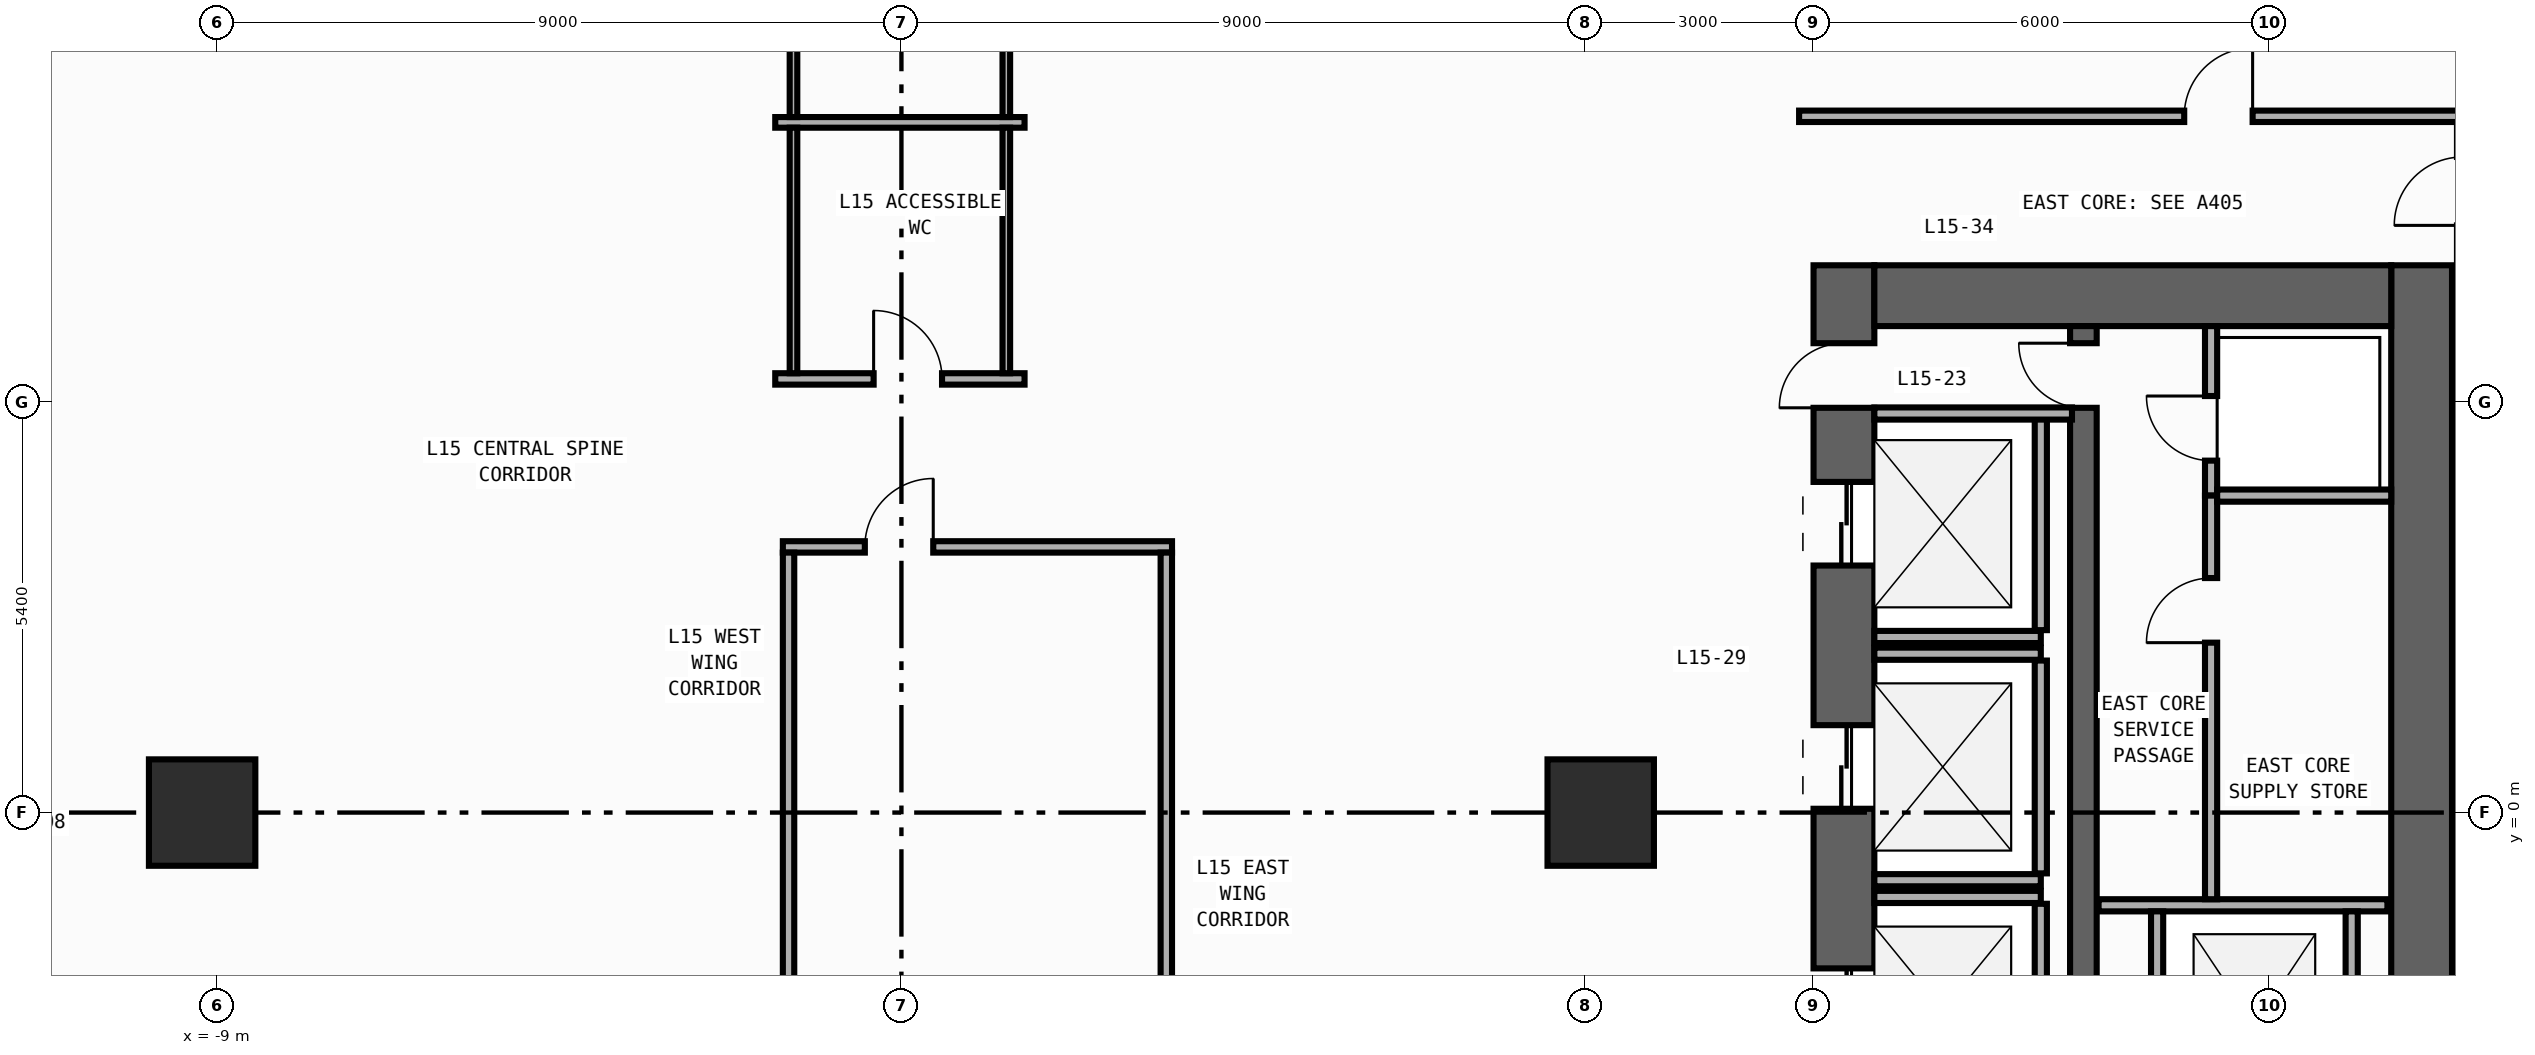
"""IFC4 building model, lengths in metres.
Left out: names, types, materials, properties, quantities, classifications, styles, units other than length and angle.
Written with IfcOpenShell. Run it as: python <this file> out.ifc"""

import sys

from ifc_helpers import new_model, si_unit, direction, frame, frame_2d, origin, origin_2d, place, context, subcontext, project, spatial, rectangle, extrude, element, fill, save


model = new_model("IFC4")
c1 = context("Model", 3, precision=1e-05, world=origin(), true_north=direction((0.0, 1.0)))
c2 = subcontext(c1, "Body", "Model", "MODEL_VIEW")
j1 = project(units=[si_unit("LENGTHUNIT", "METRE"), si_unit("PLANEANGLEUNIT", "RADIAN")], contexts=[c1])
p1 = place(None, origin())
s1 = spatial("IfcSite", under=j1, at=p1, CompositionType="ELEMENT")
p2 = place(p1, origin())
s2 = spatial("IfcBuilding", under=s1, at=p2, CompositionType="ELEMENT")
p3 = place(p2, frame((0.0, 0.0, 63.8)))
s3 = spatial("IfcBuildingStorey", under=s2, at=p3, CompositionType="ELEMENT", Elevation=63.8)
p4 = place(p3, frame((12.4, -19.8, 0.0), z_axis=(0.0, 0.0, 1.0), x_axis=(0.0, 1.0, 0.0)))
e1 = element("IfcWall", 1, at=p4, inside=s3, PredefinedType="SHEAR", context=c2, shape_type="SweptSolid", body=[
    extrude(rectangle(XDim=27.0, YDim=0.8, at=frame_2d((13.5, 0.0))), origin(), (0.0, 0.0, 1.0), 3.94),
])
p5 = place(p4, frame((23.05, 0.0, 0.0)))
e2 = element("IfcOpeningElement", 2, at=p5, cuts=e1, PredefinedType="OPENING", context=c2, shape_type="SweptSolid", body=[
    extrude(rectangle(XDim=1.1, YDim=2.2, at=frame_2d((0.55, 1.1))), frame((0.0, 0.41, 0.0), z_axis=(0.0, -1.0, 0.0), x_axis=(1.0, 0.0, 0.0)), (0.0, 0.0, 1.0), 0.82),
])
p6 = place(p4, frame((19.85, 0.0, 0.0)))
e3 = element("IfcOpeningElement", 3, at=p6, cuts=e1, PredefinedType="OPENING", context=c2, shape_type="SweptSolid", body=[
    extrude(rectangle(XDim=1.1, YDim=2.2, at=frame_2d((0.55, 1.1))), frame((0.0, 0.41, 0.0), z_axis=(0.0, -1.0, 0.0), x_axis=(1.0, 0.0, 0.0)), (0.0, 0.0, 1.0), 0.82),
])
p7 = place(p4, frame((16.65, 0.0, 0.0)))
e4 = element("IfcOpeningElement", 4, at=p7, cuts=e1, PredefinedType="OPENING", context=c2, shape_type="SweptSolid", body=[
    extrude(rectangle(XDim=1.1, YDim=2.2, at=frame_2d((0.55, 1.1))), frame((0.0, 0.41, 0.0), z_axis=(0.0, -1.0, 0.0), x_axis=(1.0, 0.0, 0.0)), (0.0, 0.0, 1.0), 0.82),
])
p8 = place(p4, frame((10.175, 0.0, 0.0)))
e5 = element("IfcOpeningElement", 5, at=p8, cuts=e1, PredefinedType="OPENING", context=c2, shape_type="SweptSolid", body=[
    extrude(rectangle(XDim=0.85, YDim=2.1, at=frame_2d((0.425, 1.05))), frame((0.0, 0.41, 0.0), z_axis=(0.0, -1.0, 0.0), x_axis=(1.0, 0.0, 0.0)), (0.0, 0.0, 1.0), 0.82),
])
p9 = place(p4, frame((12.725, 0.0, 0.0)))
e6 = element("IfcOpeningElement", 6, at=p9, cuts=e1, PredefinedType="OPENING", context=c2, shape_type="SweptSolid", body=[
    extrude(rectangle(XDim=1.15, YDim=2.2, at=frame_2d((0.575, 1.1))), frame((0.0, 0.41, 0.0), z_axis=(0.0, -1.0, 0.0), x_axis=(1.0, 0.0, 0.0)), (0.0, 0.0, 1.0), 0.82),
])
p10 = place(p4, frame((25.125, 0.0, 0.0)))
e7 = element("IfcOpeningElement", 7, at=p10, cuts=e1, PredefinedType="OPENING", context=c2, shape_type="SweptSolid", body=[
    extrude(rectangle(XDim=0.85, YDim=2.1, at=frame_2d((0.425, 1.05))), frame((0.0, 0.41, 0.0), z_axis=(0.0, -1.0, 0.0), x_axis=(1.0, 0.0, 0.0)), (0.0, 0.0, 1.0), 0.82),
])
p11 = place(p3, frame((20.0, -19.8, 0.0), z_axis=(0.0, 0.0, 1.0), x_axis=(0.0, 1.0, 0.0)))
e8 = element("IfcWall", 8, at=p11, inside=s3, PredefinedType="SHEAR", context=c2, shape_type="SweptSolid", body=[
    extrude(rectangle(XDim=27.0, YDim=0.8, at=frame_2d((13.5, 0.0))), origin(), (0.0, 0.0, 1.0), 3.94),
])
p12 = place(p3, frame((12.8, 6.8, 0.0), z_axis=(0.0, 0.0, 1.0), x_axis=(1.0, 0.0, 0.0)))
e9 = element("IfcWall", 9, at=p12, inside=s3, PredefinedType="SHEAR", context=c2, shape_type="SweptSolid", body=[
    extrude(rectangle(XDim=6.8, YDim=0.8, at=frame_2d((3.4, 0.0))), origin(), (0.0, 0.0, 1.0), 3.94),
])
p13 = place(p3, frame((15.55, -19.0, 0.0), z_axis=(0.0, 0.0, 1.0), x_axis=(0.0, 1.0, 0.0)))
e10 = element("IfcWall", 10, at=p13, inside=s3, PredefinedType="SHEAR", context=c2, shape_type="SweptSolid", body=[
    extrude(rectangle(XDim=25.4, YDim=0.35, at=frame_2d((12.7, 0.0))), origin(), (0.0, 0.0, 1.0), 3.94),
])
p14 = place(p13, frame((11.925, 0.0, 0.0)))
e11 = element("IfcOpeningElement", 11, at=p14, cuts=e10, PredefinedType="OPENING", context=c2, shape_type="SweptSolid", body=[
    extrude(rectangle(XDim=1.15, YDim=2.2, at=frame_2d((0.575, 1.1))), frame((0.0, 0.185, 0.0), z_axis=(0.0, -1.0, 0.0), x_axis=(1.0, 0.0, 0.0)), (0.0, 0.0, 1.0), 0.37),
])
p15 = place(p13, frame((24.325, 0.0, 0.0)))
e12 = element("IfcOpeningElement", 12, at=p15, cuts=e10, PredefinedType="OPENING", context=c2, shape_type="SweptSolid", body=[
    extrude(rectangle(XDim=0.85, YDim=2.1, at=frame_2d((0.425, 1.05))), frame((0.0, 0.185, 0.0), z_axis=(0.0, -1.0, 0.0), x_axis=(1.0, 0.0, 0.0)), (0.0, 0.0, 1.0), 0.37),
])
for number, where, z_axis, x_axis in (
    (13, (-9.2, 0.0, 0.0), (0.0, 0.0, 1.0), (1.0, 0.0, 0.0)),
    (14, (9.2, 0.0, 0.0), (0.0, 0.0, 1.0), (1.0, 0.0, 0.0)),
):
    element("IfcColumn", number, at=place(p3, frame(where, z_axis=z_axis, x_axis=x_axis)), inside=s3, PredefinedType="COLUMN", context=c2, shape_type="SweptSolid", body=[
        extrude(rectangle(XDim=1.4, YDim=1.4, at=origin_2d()), origin(), (0.0, 0.0, 1.0), 4.2),
    ])
p16 = place(p3, frame((12.8, 2.31, 0.0), z_axis=(0.0, 0.0, 1.0), x_axis=(1.0, 0.0, 0.0)))
e15 = element("IfcWall", 15, at=p16, inside=s3, PredefinedType="STANDARD", context=c2, shape_type="SweptSolid", body=[
    extrude(rectangle(XDim=2.19, YDim=0.16, at=frame_2d((1.095, 0.0))), origin(), (0.0, 0.0, 1.0), 3.94),
])
p17 = place(p3, frame((14.99, 2.4, 0.0), z_axis=(0.0, 0.0, 1.0), x_axis=(0.0, 1.0, 0.0)))
e16 = element("IfcWall", 16, at=p17, inside=s3, PredefinedType="STANDARD", context=c2, shape_type="SweptSolid", body=[
    extrude(rectangle(XDim=2.8, YDim=0.16, at=frame_2d((1.4, 0.0))), origin(), (0.0, 0.0, 1.0), 3.94),
])
for number, where, z_axis, x_axis in (
    (17, (12.8, -0.89, 0.0), (0.0, 0.0, 1.0), (1.0, 0.0, 0.0)),
    (18, (12.8, 2.09, 0.0), (0.0, 0.0, 1.0), (1.0, 0.0, 0.0)),
):
    element("IfcWall", number, at=place(p3, frame(where, z_axis=z_axis, x_axis=x_axis)), inside=s3, PredefinedType="STANDARD", context=c2, shape_type="SweptSolid", body=[
        extrude(rectangle(XDim=2.19, YDim=0.16, at=frame_2d((1.095, 0.0))), origin(), (0.0, 0.0, 1.0), 3.94),
    ])
p18 = place(p3, frame((14.99, -0.8, 0.0), z_axis=(0.0, 0.0, 1.0), x_axis=(0.0, 1.0, 0.0)))
e19 = element("IfcWall", 19, at=p18, inside=s3, PredefinedType="STANDARD", context=c2, shape_type="SweptSolid", body=[
    extrude(rectangle(XDim=2.8, YDim=0.16, at=frame_2d((1.4, 0.0))), origin(), (0.0, 0.0, 1.0), 3.94),
])
p19 = place(p3, frame((12.8, -1.11, 0.0), z_axis=(0.0, 0.0, 1.0), x_axis=(1.0, 0.0, 0.0)))
e20 = element("IfcWall", 20, at=p19, inside=s3, PredefinedType="STANDARD", context=c2, shape_type="SweptSolid", body=[
    extrude(rectangle(XDim=2.19, YDim=0.16, at=frame_2d((1.095, 0.0))), origin(), (0.0, 0.0, 1.0), 3.94),
])
p20 = place(p3, frame((14.99, -4.0, 0.0), z_axis=(0.0, 0.0, 1.0), x_axis=(0.0, 1.0, 0.0)))
e21 = element("IfcWall", 21, at=p20, inside=s3, PredefinedType="STANDARD", context=c2, shape_type="SweptSolid", body=[
    extrude(rectangle(XDim=2.8, YDim=0.16, at=frame_2d((1.4, 0.0))), origin(), (0.0, 0.0, 1.0), 3.94),
])
p21 = place(p3, frame((15.75, -1.22, 0.0), z_axis=(0.0, 0.0, 1.0), x_axis=(1.0, 0.0, 0.0)))
e22 = element("IfcWall", 22, at=p21, inside=s3, PredefinedType="STANDARD", context=c2, shape_type="SweptSolid", body=[
    extrude(rectangle(XDim=3.8, YDim=0.16, at=frame_2d((1.9, 0.0))), origin(), (0.0, 0.0, 1.0), 3.94),
])
for number, where, z_axis, x_axis in (
    (23, (16.52, -4.28, 0.0), (0.0, 0.0, 1.0), (0.0, 1.0, 0.0)),
    (24, (19.08, -4.28, 0.0), (0.0, 0.0, 1.0), (0.0, 1.0, 0.0)),
):
    element("IfcWall", number, at=place(p3, frame(where, z_axis=z_axis, x_axis=x_axis)), inside=s3, PredefinedType="STANDARD", context=c2, shape_type="SweptSolid", body=[
        extrude(rectangle(XDim=2.98, YDim=0.16, at=frame_2d((1.49, 0.0))), origin(), (0.0, 0.0, 1.0), 3.94),
    ])
p22 = place(p3, frame((12.8, 5.25, 0.0), z_axis=(0.0, 0.0, 1.0), x_axis=(1.0, 0.0, 0.0)))
e25 = element("IfcWall", 25, at=p22, inside=s3, PredefinedType="STANDARD", context=c2, shape_type="SweptSolid", body=[
    extrude(rectangle(XDim=2.6, YDim=0.16, at=frame_2d((1.3, 0.0))), origin(), (0.0, 0.0, 1.0), 3.94),
])
p23 = place(p3, frame((17.23, 4.17, 0.0), z_axis=(0.0, 0.0, 1.0), x_axis=(0.0, 1.0, 0.0)))
e26 = element("IfcWall", 26, at=p23, inside=s3, PredefinedType="PARTITIONING", context=c2, shape_type="SweptSolid", body=[
    extrude(rectangle(XDim=2.23, YDim=0.16, at=frame_2d((1.115, 0.0))), origin(), (0.0, 0.0, 1.0), 3.94),
])
p24 = place(p23, frame((0.46, 0.0, 0.0)))
e27 = element("IfcOpeningElement", 27, at=p24, cuts=e26, PredefinedType="OPENING", context=c2, shape_type="SweptSolid", body=[
    extrude(rectangle(XDim=0.85, YDim=2.1, at=frame_2d((0.425, 1.05))), frame((0.0, 0.09, 0.0), z_axis=(0.0, -1.0, 0.0), x_axis=(1.0, 0.0, 0.0)), (0.0, 0.0, 1.0), 0.18),
])
p25 = place(p3, frame((17.23, -1.14, 0.0), z_axis=(0.0, 0.0, 1.0), x_axis=(0.0, 1.0, 0.0)))
e28 = element("IfcWall", 28, at=p25, inside=s3, PredefinedType="PARTITIONING", context=c2, shape_type="SweptSolid", body=[
    extrude(rectangle(XDim=5.31, YDim=0.16, at=frame_2d((2.655, 0.0))), origin(), (0.0, 0.0, 1.0), 3.94),
])
p26 = place(p25, frame((3.375, 0.0, 0.0)))
e29 = element("IfcOpeningElement", 29, at=p26, cuts=e28, PredefinedType="OPENING", context=c2, shape_type="SweptSolid", body=[
    extrude(rectangle(XDim=0.85, YDim=2.1, at=frame_2d((0.425, 1.05))), frame((0.0, 0.09, 0.0), z_axis=(0.0, -1.0, 0.0), x_axis=(1.0, 0.0, 0.0)), (0.0, 0.0, 1.0), 0.18),
])
p27 = place(p3, frame((17.31, 4.17, 0.0), z_axis=(0.0, 0.0, 1.0), x_axis=(1.0, 0.0, 0.0)))
e30 = element("IfcWall", 30, at=p27, inside=s3, PredefinedType="PARTITIONING", context=c2, shape_type="SweptSolid", body=[
    extrude(rectangle(XDim=2.29, YDim=0.16, at=frame_2d((1.145, 0.0))), origin(), (0.0, 0.0, 1.0), 3.94),
])
p28 = place(p3, frame((-1.66, 5.705, 0.0), z_axis=(0.0, 0.0, 1.0), x_axis=(1.0, 0.0, 0.0)))
e31 = element("IfcWall", 31, at=p28, inside=s3, PredefinedType="PARTITIONING", context=c2, shape_type="SweptSolid", body=[
    extrude(rectangle(XDim=3.28, YDim=0.15, at=frame_2d((1.64, 0.0))), origin(), (0.0, 0.0, 1.0), 3.94),
])
p29 = place(p28, frame((1.294, 0.0, 0.0)))
e32 = element("IfcOpeningElement", 32, at=p29, cuts=e31, PredefinedType="OPENING", context=c2, shape_type="SweptSolid", body=[
    extrude(rectangle(XDim=0.9, YDim=2.15, at=frame_2d((0.45, 1.075))), frame((0.0, 0.085, 0.0), z_axis=(0.0, -1.0, 0.0), x_axis=(1.0, 0.0, 0.0)), (0.0, 0.0, 1.0), 0.17),
])
p30 = place(p3, frame((-1.56, 3.495, 0.0), z_axis=(0.0, 0.0, 1.0), x_axis=(1.0, 0.0, 0.0)))
e33 = element("IfcWall", 33, at=p30, inside=s3, PredefinedType="PARTITIONING", context=c2, shape_type="SweptSolid", body=[
    extrude(rectangle(XDim=5.12, YDim=0.15, at=frame_2d((2.56, 0.0))), origin(), (0.0, 0.0, 1.0), 3.94),
])
p31 = place(p30, frame((1.079, 0.0, 0.0)))
e34 = element("IfcOpeningElement", 34, at=p31, cuts=e33, PredefinedType="OPENING", context=c2, shape_type="SweptSolid", body=[
    extrude(rectangle(XDim=0.9, YDim=2.15, at=frame_2d((0.45, 1.075))), frame((0.0, 0.085, 0.0), z_axis=(0.0, -1.0, 0.0), x_axis=(1.0, 0.0, 0.0)), (0.0, 0.0, 1.0), 0.17),
])
p32 = place(p3, frame((-1.485, -15.385, 0.0), z_axis=(0.0, 0.0, 1.0), x_axis=(0.0, 1.0, 0.0)))
e35 = element("IfcWall", 35, at=p32, inside=s3, PredefinedType="PARTITIONING", context=c2, shape_type="SweptSolid", body=[
    extrude(rectangle(XDim=18.805, YDim=0.15, at=frame_2d((9.402, 0.0))), origin(), (0.0, 0.0, 1.0), 3.94),
])
p33 = place(p32, frame((9.559, 0.0, 0.0)))
e36 = element("IfcOpeningElement", 36, at=p33, cuts=e35, PredefinedType="OPENING", context=c2, shape_type="SweptSolid", body=[
    extrude(rectangle(XDim=0.9, YDim=2.15, at=frame_2d((0.45, 1.075))), frame((0.0, 0.085, 0.0), z_axis=(0.0, -1.0, 0.0), x_axis=(1.0, 0.0, 0.0)), (0.0, 0.0, 1.0), 0.17),
])
p34 = place(p3, frame((3.485, -15.385, 0.0), z_axis=(0.0, 0.0, 1.0), x_axis=(0.0, 1.0, 0.0)))
e37 = element("IfcWall", 37, at=p34, inside=s3, PredefinedType="PARTITIONING", context=c2, shape_type="SweptSolid", body=[
    extrude(rectangle(XDim=18.805, YDim=0.15, at=frame_2d((9.402, 0.0))), origin(), (0.0, 0.0, 1.0), 3.94),
])
p35 = place(p34, frame((9.559, 0.0, 0.0)))
e38 = element("IfcOpeningElement", 38, at=p35, cuts=e37, PredefinedType="OPENING", context=c2, shape_type="SweptSolid", body=[
    extrude(rectangle(XDim=0.9, YDim=2.15, at=frame_2d((0.45, 1.075))), frame((0.0, 0.085, 0.0), z_axis=(0.0, -1.0, 0.0), x_axis=(1.0, 0.0, 0.0)), (0.0, 0.0, 1.0), 0.17),
])
p36 = place(p3, frame((11.81, 9.16, 0.0), z_axis=(0.0, 0.0, 1.0), x_axis=(1.0, 0.0, 0.0)))
e39 = element("IfcWall", 39, at=p36, inside=s3, PredefinedType="PARTITIONING", context=c2, shape_type="SweptSolid", body=[
    extrude(rectangle(XDim=8.83, YDim=0.15, at=frame_2d((4.415, 0.0))), origin(), (0.0, 0.0, 1.0), 3.94),
])
p37 = place(p36, frame((5.067, 0.0, 0.0)))
e40 = element("IfcOpeningElement", 40, at=p37, cuts=e39, PredefinedType="OPENING", context=c2, shape_type="SweptSolid", body=[
    extrude(rectangle(XDim=0.9, YDim=2.15, at=frame_2d((0.45, 1.075))), frame((0.0, 0.085, 0.0), z_axis=(0.0, -1.0, 0.0), x_axis=(1.0, 0.0, 0.0)), (0.0, 0.0, 1.0), 0.17),
])
p38 = place(p3, frame((-1.66, 9.08, 0.0), z_axis=(0.0, 0.0, 1.0), x_axis=(1.0, 0.0, 0.0)))
e41 = element("IfcWall", 41, at=p38, inside=s3, PredefinedType="PARTITIONING", context=c2, shape_type="SweptSolid", body=[
    extrude(rectangle(XDim=3.28, YDim=0.14, at=frame_2d((1.64, 0.0))), origin(), (0.0, 0.0, 1.0), 3.94),
])
for number, where, z_axis, x_axis in (
    (42, (1.38, 9.01, 0.0), (0.0, 0.0, 1.0), (0.0, -1.0, 0.0)),
    (43, (-1.42, 5.78, 0.0), (0.0, 0.0, 1.0), (0.0, 1.0, 0.0)),
):
    element("IfcWall", number, at=place(p3, frame(where, z_axis=z_axis, x_axis=x_axis)), inside=s3, PredefinedType="PARTITIONING", context=c2, shape_type="SweptSolid", body=[
        extrude(rectangle(XDim=3.23, YDim=0.1, at=frame_2d((1.615, 0.0))), origin(), (0.0, 0.0, 1.0), 3.94),
    ])
for number, where, z_axis, x_axis in (
    (44, (1.38, 15.41, 0.0), (0.0, 0.0, 1.0), (0.0, -1.0, 0.0)),
    (45, (-1.42, 9.15, 0.0), (0.0, 0.0, 1.0), (0.0, 1.0, 0.0)),
):
    element("IfcWall", number, at=place(p3, frame(where, z_axis=z_axis, x_axis=x_axis)), inside=s3, PredefinedType="PARTITIONING", context=c2, shape_type="SweptSolid", body=[
        extrude(rectangle(XDim=6.26, YDim=0.1, at=frame_2d((3.13, 0.0))), origin(), (0.0, 0.0, 1.0), 3.94),
    ])
p39 = place(p5, origin())
e46 = element("IfcDoor", 46, at=p39, inside=s3, OperationType="DOUBLE_DOOR_SLIDING", PredefinedType="DOOR", context=c2, shape_type="SweptSolid", body=[
    extrude(rectangle(XDim=1.1, YDim=2.2, at=frame_2d((0.55, 1.1))), frame((0.0, 0.025, 0.0), z_axis=(0.0, -1.0, 0.0), x_axis=(1.0, 0.0, 0.0)), (0.0, 0.0, 1.0), 0.05),
])
fill(e2, e46)
p40 = place(p6, origin())
e47 = element("IfcDoor", 47, at=p40, inside=s3, OperationType="DOUBLE_DOOR_SLIDING", PredefinedType="DOOR", context=c2, shape_type="SweptSolid", body=[
    extrude(rectangle(XDim=1.1, YDim=2.2, at=frame_2d((0.55, 1.1))), frame((0.0, 0.025, 0.0), z_axis=(0.0, -1.0, 0.0), x_axis=(1.0, 0.0, 0.0)), (0.0, 0.0, 1.0), 0.05),
])
fill(e3, e47)
p41 = place(p7, origin())
e48 = element("IfcDoor", 48, at=p41, inside=s3, OperationType="DOUBLE_DOOR_SLIDING", PredefinedType="DOOR", context=c2, shape_type="SweptSolid", body=[
    extrude(rectangle(XDim=1.1, YDim=2.2, at=frame_2d((0.55, 1.1))), frame((0.0, 0.025, 0.0), z_axis=(0.0, -1.0, 0.0), x_axis=(1.0, 0.0, 0.0)), (0.0, 0.0, 1.0), 0.05),
])
fill(e4, e48)
p42 = place(p10, origin())
e49 = element("IfcDoor", 49, at=p42, inside=s3, OperationType="SINGLE_SWING_LEFT", PredefinedType="DOOR", context=c2, shape_type="SweptSolid", body=[
    extrude(rectangle(XDim=0.85, YDim=2.1, at=frame_2d((0.425, 1.05))), frame((0.0, 0.025, 0.0), z_axis=(0.0, -1.0, 0.0), x_axis=(1.0, 0.0, 0.0)), (0.0, 0.0, 1.0), 0.05),
])
fill(e7, e49)
p43 = place(p15, origin())
e50 = element("IfcDoor", 50, at=p43, inside=s3, OperationType="SINGLE_SWING_RIGHT", PredefinedType="DOOR", context=c2, shape_type="SweptSolid", body=[
    extrude(rectangle(XDim=0.85, YDim=2.1, at=frame_2d((0.425, 1.05))), frame((0.0, 0.025, 0.0), z_axis=(0.0, -1.0, 0.0), x_axis=(1.0, 0.0, 0.0)), (0.0, 0.0, 1.0), 0.05),
])
fill(e12, e50)
p44 = place(p24, origin())
e51 = element("IfcDoor", 51, at=p44, inside=s3, OperationType="SINGLE_SWING_RIGHT", PredefinedType="DOOR", context=c2, shape_type="SweptSolid", body=[
    extrude(rectangle(XDim=0.85, YDim=2.1, at=frame_2d((0.425, 1.05))), frame((0.0, 0.025, 0.0), z_axis=(0.0, -1.0, 0.0), x_axis=(1.0, 0.0, 0.0)), (0.0, 0.0, 1.0), 0.05),
])
fill(e27, e51)
p45 = place(p26, origin())
e52 = element("IfcDoor", 52, at=p45, inside=s3, OperationType="SINGLE_SWING_LEFT", PredefinedType="DOOR", context=c2, shape_type="SweptSolid", body=[
    extrude(rectangle(XDim=0.85, YDim=2.1, at=frame_2d((0.425, 1.05))), frame((0.0, 0.025, 0.0), z_axis=(0.0, -1.0, 0.0), x_axis=(1.0, 0.0, 0.0)), (0.0, 0.0, 1.0), 0.05),
])
fill(e29, e52)
p46 = place(p29, origin())
e53 = element("IfcDoor", 53, at=p46, inside=s3, OperationType="SINGLE_SWING_LEFT", PredefinedType="DOOR", context=c2, shape_type="SweptSolid", body=[
    extrude(rectangle(XDim=0.9, YDim=2.15, at=frame_2d((0.45, 1.075))), frame((0.0, 0.025, 0.0), z_axis=(0.0, -1.0, 0.0), x_axis=(1.0, 0.0, 0.0)), (0.0, 0.0, 1.0), 0.05),
])
fill(e32, e53)
p47 = place(p31, origin())
e54 = element("IfcDoor", 54, at=p47, inside=s3, OperationType="SINGLE_SWING_RIGHT", PredefinedType="DOOR", context=c2, shape_type="SweptSolid", body=[
    extrude(rectangle(XDim=0.9, YDim=2.15, at=frame_2d((0.45, 1.075))), frame((0.0, 0.025, 0.0), z_axis=(0.0, -1.0, 0.0), x_axis=(1.0, 0.0, 0.0)), (0.0, 0.0, 1.0), 0.05),
])
fill(e34, e54)
p48 = place(p37, origin())
e55 = element("IfcDoor", 55, at=p48, inside=s3, OperationType="SINGLE_SWING_RIGHT", PredefinedType="DOOR", context=c2, shape_type="SweptSolid", body=[
    extrude(rectangle(XDim=0.9, YDim=2.15, at=frame_2d((0.45, 1.075))), frame((0.0, 0.025, 0.0), z_axis=(0.0, -1.0, 0.0), x_axis=(1.0, 0.0, 0.0)), (0.0, 0.0, 1.0), 0.05),
])
fill(e40, e55)
save(model, sys.argv[1])
